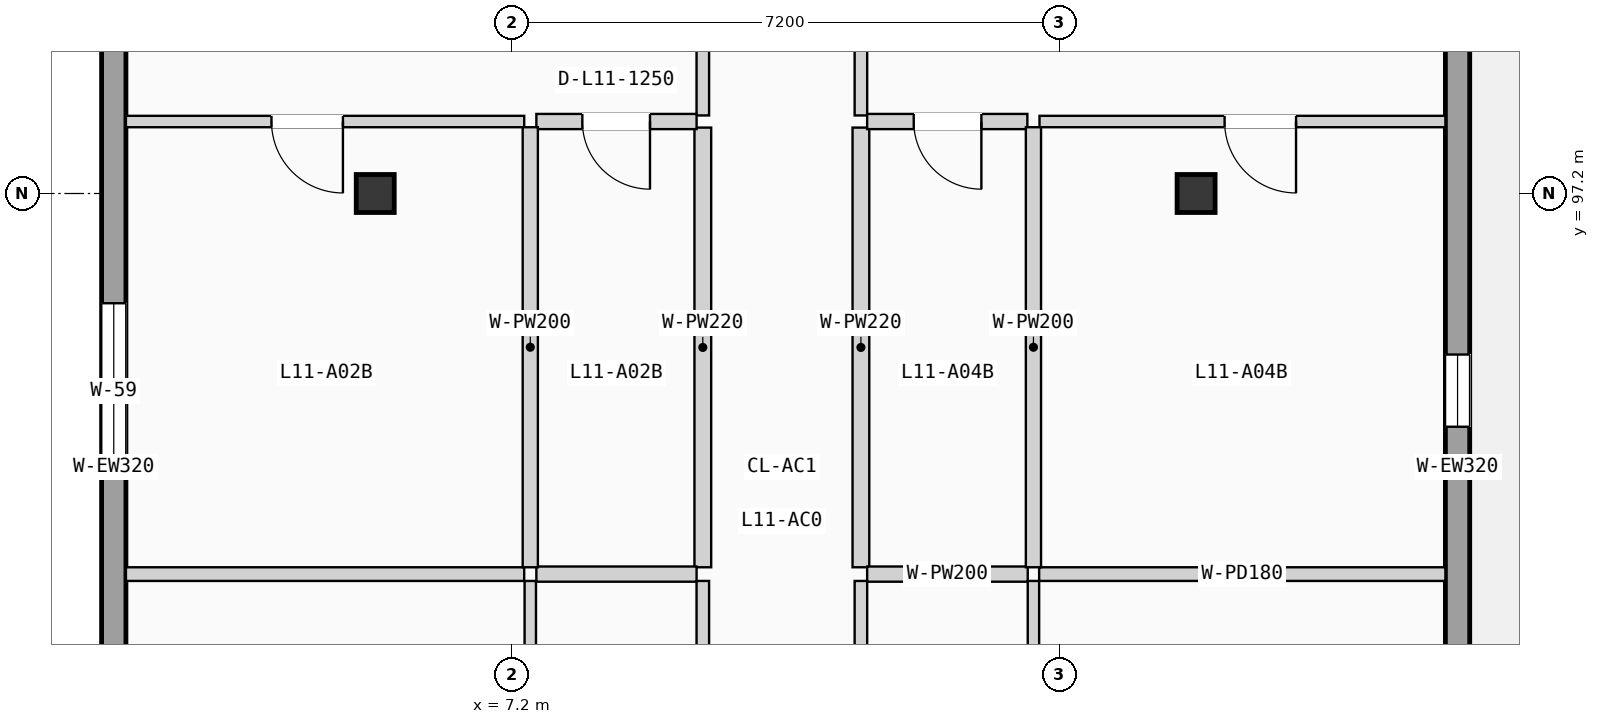
"""IFC4 building model, lengths in metres.
Left out: names, types, materials, properties, quantities, classifications, styles, units other than length and angle.
Written with IfcOpenShell. Run it as: python <this file> out.ifc"""

import sys

from ifc_helpers import new_model, si_unit, direction, frame, frame_2d, origin, origin_2d, place, context, subcontext, project, spatial, rectangle, extrude, element, fill, save


model = new_model("IFC4")
c1 = context("Model", 3, precision=1e-05, world=origin(), true_north=direction((0.0, 1.0)))
c2 = subcontext(c1, "Body", "Model", "MODEL_VIEW")
j1 = project(units=[si_unit("LENGTHUNIT", "METRE"), si_unit("PLANEANGLEUNIT", "RADIAN")], contexts=[c1])
p1 = place(None, origin())
s1 = spatial("IfcSite", under=j1, at=p1, CompositionType="ELEMENT")
p2 = place(p1, origin())
s2 = spatial("IfcBuilding", under=s1, at=p2, CompositionType="ELEMENT")
p3 = place(p2, frame((0.0, 0.0, 37.275)))
s3 = spatial("IfcBuildingStorey", under=s2, at=p3, CompositionType="ELEMENT", Elevation=37.275)
for number, where, z_axis, x_axis in (
    (1, (5.4, 97.2, 0.0), (0.0, 0.0, 1.0), (1.0, 0.0, 0.0)),
    (2, (16.2, 97.2, 0.0), (0.0, 0.0, 1.0), (1.0, 0.0, 0.0)),
):
    element("IfcColumn", number, at=place(p3, frame(where, z_axis=z_axis, x_axis=x_axis)), inside=s3, PredefinedType="COLUMN", context=c2, shape_type="SweptSolid", body=[
        extrude(rectangle(XDim=0.5, YDim=0.5, at=origin_2d()), origin(), (0.0, 0.0, 1.0), 3.15),
    ])
p4 = place(p3, frame((1.96, 68.72, 0.0), z_axis=(0.0, 0.0, 1.0), x_axis=(0.0, 1.0, 0.0)))
e3 = element("IfcWall", 3, at=p4, inside=s3, PredefinedType="SOLIDWALL", context=c2, shape_type="SweptSolid", body=[
    extrude(rectangle(XDim=49.76, YDim=0.32, at=frame_2d((24.88, 0.0))), origin(), (0.0, 0.0, 1.0), 2.9),
])
p5 = place(p4, frame((15.855, 0.0, 0.85)))
e4 = element("IfcOpeningElement", 4, at=p5, cuts=e3, PredefinedType="OPENING", context=c2, shape_type="SweptSolid", body=[
    extrude(rectangle(XDim=0.95, YDim=1.2, at=frame_2d((0.475, 0.6))), frame((0.0, 0.17, 0.0), z_axis=(0.0, -1.0, 0.0), x_axis=(1.0, 0.0, 0.0)), (0.0, 0.0, 1.0), 0.34),
])
p6 = place(p4, frame((8.586, 0.0, 0.9)))
e5 = element("IfcOpeningElement", 5, at=p6, cuts=e3, PredefinedType="OPENING", context=c2, shape_type="SweptSolid", body=[
    extrude(rectangle(XDim=2.3, YDim=1.2, at=frame_2d((1.15, 0.6))), frame((0.0, 0.17, 0.0), z_axis=(0.0, -1.0, 0.0), x_axis=(1.0, 0.0, 0.0)), (0.0, 0.0, 1.0), 0.34),
])
p7 = place(p4, frame((19.265, 0.0, 0.85)))
e6 = element("IfcOpeningElement", 6, at=p7, cuts=e3, PredefinedType="OPENING", context=c2, shape_type="SweptSolid", body=[
    extrude(rectangle(XDim=0.95, YDim=1.2, at=frame_2d((0.475, 0.6))), frame((0.0, 0.17, 0.0), z_axis=(0.0, -1.0, 0.0), x_axis=(1.0, 0.0, 0.0)), (0.0, 0.0, 1.0), 0.34),
])
p8 = place(p4, frame((31.309, 0.0, 0.715)))
e7 = element("IfcOpeningElement", 7, at=p8, cuts=e3, PredefinedType="OPENING", context=c2, shape_type="SweptSolid", body=[
    extrude(rectangle(XDim=2.3, YDim=1.5, at=frame_2d((1.15, 0.75))), frame((0.0, 0.17, 0.0), z_axis=(0.0, -1.0, 0.0), x_axis=(1.0, 0.0, 0.0)), (0.0, 0.0, 1.0), 0.34),
])
p9 = place(p4, frame((24.736, 0.0, 0.565)))
e8 = element("IfcOpeningElement", 8, at=p9, cuts=e3, PredefinedType="OPENING", context=c2, shape_type="SweptSolid", body=[
    extrude(rectangle(XDim=2.3, YDim=1.65, at=frame_2d((1.15, 0.825))), frame((0.0, 0.17, 0.0), z_axis=(0.0, -1.0, 0.0), x_axis=(1.0, 0.0, 0.0)), (0.0, 0.0, 1.0), 0.34),
])
p10 = place(p4, frame((39.113, 0.0, 0.85)))
e9 = element("IfcOpeningElement", 9, at=p10, cuts=e3, PredefinedType="OPENING", context=c2, shape_type="SweptSolid", body=[
    extrude(rectangle(XDim=0.95, YDim=1.2, at=frame_2d((0.475, 0.6))), frame((0.0, 0.17, 0.0), z_axis=(0.0, -1.0, 0.0), x_axis=(1.0, 0.0, 0.0)), (0.0, 0.0, 1.0), 0.34),
])
p11 = place(p3, frame((19.64, 68.72, 0.0), z_axis=(0.0, 0.0, 1.0), x_axis=(0.0, 1.0, 0.0)))
e10 = element("IfcWall", 10, at=p11, inside=s3, PredefinedType="SOLIDWALL", context=c2, shape_type="SweptSolid", body=[
    extrude(rectangle(XDim=49.76, YDim=0.32, at=frame_2d((24.88, 0.0))), origin(), (0.0, 0.0, 1.0), 2.9),
])
p12 = place(p11, frame((16.27, 0.0, 0.0)))
e11 = element("IfcOpeningElement", 11, at=p12, cuts=e10, PredefinedType="OPENING", context=c2, shape_type="SweptSolid", body=[
    extrude(rectangle(XDim=0.95, YDim=2.15, at=frame_2d((0.475, 1.075))), frame((0.0, 0.17, 0.0), z_axis=(0.0, -1.0, 0.0), x_axis=(1.0, 0.0, 0.0)), (0.0, 0.0, 1.0), 0.34),
])
p13 = place(p11, frame((9.261, 0.0, 0.9)))
e12 = element("IfcOpeningElement", 12, at=p13, cuts=e10, PredefinedType="OPENING", context=c2, shape_type="SweptSolid", body=[
    extrude(rectangle(XDim=0.95, YDim=1.2, at=frame_2d((0.475, 0.6))), frame((0.0, 0.17, 0.0), z_axis=(0.0, -1.0, 0.0), x_axis=(1.0, 0.0, 0.0)), (0.0, 0.0, 1.0), 0.34),
])
p14 = place(p11, frame((19.265, 0.0, 0.865)))
e13 = element("IfcOpeningElement", 13, at=p14, cuts=e10, PredefinedType="OPENING", context=c2, shape_type="SweptSolid", body=[
    extrude(rectangle(XDim=0.95, YDim=1.35, at=frame_2d((0.475, 0.675))), frame((0.0, 0.17, 0.0), z_axis=(0.0, -1.0, 0.0), x_axis=(1.0, 0.0, 0.0)), (0.0, 0.0, 1.0), 0.34),
])
p15 = place(p11, frame((31.984, 0.0, 0.715)))
e14 = element("IfcOpeningElement", 14, at=p15, cuts=e10, PredefinedType="OPENING", context=c2, shape_type="SweptSolid", body=[
    extrude(rectangle(XDim=0.95, YDim=1.5, at=frame_2d((0.475, 0.75))), frame((0.0, 0.17, 0.0), z_axis=(0.0, -1.0, 0.0), x_axis=(1.0, 0.0, 0.0)), (0.0, 0.0, 1.0), 0.34),
])
p16 = place(p11, frame((25.411, 0.0, 0.565)))
e15 = element("IfcOpeningElement", 15, at=p16, cuts=e10, PredefinedType="OPENING", context=c2, shape_type="SweptSolid", body=[
    extrude(rectangle(XDim=0.95, YDim=1.65, at=frame_2d((0.475, 0.825))), frame((0.0, 0.17, 0.0), z_axis=(0.0, -1.0, 0.0), x_axis=(1.0, 0.0, 0.0)), (0.0, 0.0, 1.0), 0.34),
])
p17 = place(p11, frame((39.113, 0.0, 0.85)))
e16 = element("IfcOpeningElement", 16, at=p17, cuts=e10, PredefinedType="OPENING", context=c2, shape_type="SweptSolid", body=[
    extrude(rectangle(XDim=0.95, YDim=1.2, at=frame_2d((0.475, 0.6))), frame((0.0, 0.17, 0.0), z_axis=(0.0, -1.0, 0.0), x_axis=(1.0, 0.0, 0.0)), (0.0, 0.0, 1.0), 0.34),
])
p18 = place(p3, frame((9.71, 87.19, 0.0), z_axis=(0.0, 0.0, 1.0), x_axis=(0.0, 1.0, 0.0)))
e17 = element("IfcWall", 17, at=p18, inside=s3, PredefinedType="PARTITIONING", context=c2, shape_type="SweptSolid", body=[
    extrude(rectangle(XDim=4.912, YDim=0.165, at=frame_2d((2.456, 0.0))), origin(), (0.0, 0.0, 1.0), 2.87),
])
p19 = place(p3, frame((9.71, 98.227, 0.0), z_axis=(0.0, 0.0, 1.0), x_axis=(0.0, 1.0, 0.0)))
e18 = element("IfcWall", 18, at=p19, inside=s3, PredefinedType="PARTITIONING", context=c2, shape_type="SweptSolid", body=[
    extrude(rectangle(XDim=7.028, YDim=0.165, at=frame_2d((3.514, 0.0))), origin(), (0.0, 0.0, 1.0), 2.87),
])
p20 = place(p19, frame((3.024, 0.0, 0.0)))
e19 = element("IfcOpeningElement", 19, at=p20, cuts=e18, PredefinedType="OPENING", context=c2, shape_type="SweptSolid", body=[
    extrude(rectangle(XDim=0.98, YDim=2.08, at=frame_2d((0.49, 1.04))), frame((0.0, 0.093, 0.0), z_axis=(0.0, -1.0, 0.0), x_axis=(1.0, 0.0, 0.0)), (0.0, 0.0, 1.0), 0.185),
])
p21 = place(p3, frame((9.71, 92.282, 0.0), z_axis=(0.0, 0.0, 1.0), x_axis=(0.0, 1.0, 0.0)))
e20 = element("IfcWall", 20, at=p21, inside=s3, PredefinedType="PLUMBINGWALL", context=c2, shape_type="SweptSolid", body=[
    extrude(rectangle(XDim=5.785, YDim=0.22, at=frame_2d((2.893, 0.0))), origin(), (0.0, 0.0, 1.0), 2.87),
])
p22 = place(p3, frame((11.79, 87.19, 0.0), z_axis=(0.0, 0.0, 1.0), x_axis=(0.0, 1.0, 0.0)))
e21 = element("IfcWall", 21, at=p22, inside=s3, PredefinedType="PARTITIONING", context=c2, shape_type="SweptSolid", body=[
    extrude(rectangle(XDim=4.912, YDim=0.165, at=frame_2d((2.456, 0.0))), origin(), (0.0, 0.0, 1.0), 2.87),
])
p23 = place(p3, frame((11.79, 98.227, 0.0), z_axis=(0.0, 0.0, 1.0), x_axis=(0.0, 1.0, 0.0)))
e22 = element("IfcWall", 22, at=p23, inside=s3, PredefinedType="PARTITIONING", context=c2, shape_type="SweptSolid", body=[
    extrude(rectangle(XDim=7.028, YDim=0.165, at=frame_2d((3.514, 0.0))), origin(), (0.0, 0.0, 1.0), 2.87),
])
p24 = place(p23, frame((3.024, 0.0, 0.0)))
e23 = element("IfcOpeningElement", 23, at=p24, cuts=e22, PredefinedType="OPENING", context=c2, shape_type="SweptSolid", body=[
    extrude(rectangle(XDim=0.98, YDim=2.08, at=frame_2d((0.49, 1.04))), frame((0.0, 0.093, 0.0), z_axis=(0.0, -1.0, 0.0), x_axis=(1.0, 0.0, 0.0)), (0.0, 0.0, 1.0), 0.185),
])
p25 = place(p3, frame((11.79, 92.282, 0.0), z_axis=(0.0, 0.0, 1.0), x_axis=(0.0, 1.0, 0.0)))
e24 = element("IfcWall", 24, at=p25, inside=s3, PredefinedType="PLUMBINGWALL", context=c2, shape_type="SweptSolid", body=[
    extrude(rectangle(XDim=5.785, YDim=0.22, at=frame_2d((2.893, 0.0))), origin(), (0.0, 0.0, 1.0), 2.87),
])
p26 = place(p3, frame((7.44, 87.17, 0.0), z_axis=(0.0, 0.0, 1.0), x_axis=(0.0, 1.0, 0.0)))
e25 = element("IfcWall", 25, at=p26, inside=s3, PredefinedType="PARTITIONING", context=c2, shape_type="SweptSolid", body=[
    extrude(rectangle(XDim=4.932, YDim=0.15, at=frame_2d((2.466, 0.0))), origin(), (0.0, 0.0, 1.0), 2.87),
])
p27 = place(p3, frame((7.52, 92.192, 0.0), z_axis=(0.0, 0.0, 1.0), x_axis=(1.0, 0.0, 0.0)))
e26 = element("IfcWall", 26, at=p27, inside=s3, PredefinedType="PLUMBINGWALL", context=c2, shape_type="SweptSolid", body=[
    extrude(rectangle(XDim=2.108, YDim=0.2, at=frame_2d((1.054, 0.0))), origin(), (0.0, 0.0, 1.0), 2.87),
])
p28 = place(p3, frame((2.12, 92.192, 0.0), z_axis=(0.0, 0.0, 1.0), x_axis=(1.0, 0.0, 0.0)))
e27 = element("IfcWall", 27, at=p28, inside=s3, PredefinedType="PARTITIONING", context=c2, shape_type="SweptSolid", body=[
    extrude(rectangle(XDim=5.24, YDim=0.18, at=frame_2d((2.62, 0.0))), origin(), (0.0, 0.0, 1.0), 2.87),
])
p29 = place(p3, frame((7.52, 98.147, 0.0), z_axis=(0.0, 0.0, 1.0), x_axis=(1.0, 0.0, 0.0)))
e28 = element("IfcWall", 28, at=p29, inside=s3, PredefinedType="PLUMBINGWALL", context=c2, shape_type="SweptSolid", body=[
    extrude(rectangle(XDim=2.108, YDim=0.2, at=frame_2d((1.054, 0.0))), origin(), (0.0, 0.0, 1.0), 2.87),
])
p30 = place(p29, frame((0.605, 0.0, 0.0)))
e29 = element("IfcOpeningElement", 29, at=p30, cuts=e28, PredefinedType="OPENING", context=c2, shape_type="SweptSolid", body=[
    extrude(rectangle(XDim=0.89, YDim=2.03, at=frame_2d((0.445, 1.015))), frame((0.0, 0.11, 0.0), z_axis=(0.0, -1.0, 0.0), x_axis=(1.0, 0.0, 0.0)), (0.0, 0.0, 1.0), 0.22),
])
p31 = place(p3, frame((2.12, 98.147, 0.0), z_axis=(0.0, 0.0, 1.0), x_axis=(1.0, 0.0, 0.0)))
e30 = element("IfcWall", 30, at=p31, inside=s3, PredefinedType="PARTITIONING", context=c2, shape_type="SweptSolid", body=[
    extrude(rectangle(XDim=5.24, YDim=0.15, at=frame_2d((2.62, 0.0))), origin(), (0.0, 0.0, 1.0), 2.87),
])
p32 = place(p31, frame((1.915, 0.0, 0.0)))
e31 = element("IfcOpeningElement", 31, at=p32, cuts=e30, PredefinedType="OPENING", context=c2, shape_type="SweptSolid", body=[
    extrude(rectangle(XDim=0.94, YDim=2.06, at=frame_2d((0.47, 1.03))), frame((0.0, 0.085, 0.0), z_axis=(0.0, -1.0, 0.0), x_axis=(1.0, 0.0, 0.0)), (0.0, 0.0, 1.0), 0.17),
])
p33 = place(p3, frame((7.44, 92.282, 0.0), z_axis=(0.0, 0.0, 1.0), x_axis=(0.0, 1.0, 0.0)))
e32 = element("IfcWall", 32, at=p33, inside=s3, PredefinedType="PLUMBINGWALL", context=c2, shape_type="SweptSolid", body=[
    extrude(rectangle(XDim=5.79, YDim=0.2, at=frame_2d((2.895, 0.0))), origin(), (0.0, 0.0, 1.0), 2.87),
])
p34 = place(p3, frame((14.06, 87.17, 0.0), z_axis=(0.0, 0.0, 1.0), x_axis=(0.0, 1.0, 0.0)))
e33 = element("IfcWall", 33, at=p34, inside=s3, PredefinedType="PARTITIONING", context=c2, shape_type="SweptSolid", body=[
    extrude(rectangle(XDim=4.932, YDim=0.15, at=frame_2d((2.466, 0.0))), origin(), (0.0, 0.0, 1.0), 2.87),
])
p35 = place(p3, frame((11.872, 92.192, 0.0), z_axis=(0.0, 0.0, 1.0), x_axis=(1.0, 0.0, 0.0)))
e34 = element("IfcWall", 34, at=p35, inside=s3, PredefinedType="PLUMBINGWALL", context=c2, shape_type="SweptSolid", body=[
    extrude(rectangle(XDim=2.113, YDim=0.2, at=frame_2d((1.057, 0.0))), origin(), (0.0, 0.0, 1.0), 2.87),
])
p36 = place(p3, frame((14.135, 92.192, 0.0), z_axis=(0.0, 0.0, 1.0), x_axis=(1.0, 0.0, 0.0)))
e35 = element("IfcWall", 35, at=p36, inside=s3, PredefinedType="PARTITIONING", context=c2, shape_type="SweptSolid", body=[
    extrude(rectangle(XDim=5.345, YDim=0.18, at=frame_2d((2.672, 0.0))), origin(), (0.0, 0.0, 1.0), 2.87),
])
p37 = place(p3, frame((11.872, 98.147, 0.0), z_axis=(0.0, 0.0, 1.0), x_axis=(1.0, 0.0, 0.0)))
e36 = element("IfcWall", 36, at=p37, inside=s3, PredefinedType="PLUMBINGWALL", context=c2, shape_type="SweptSolid", body=[
    extrude(rectangle(XDim=2.108, YDim=0.2, at=frame_2d((1.054, 0.0))), origin(), (0.0, 0.0, 1.0), 2.87),
])
p38 = place(p37, frame((0.613, 0.0, 0.0)))
e37 = element("IfcOpeningElement", 37, at=p38, cuts=e36, PredefinedType="OPENING", context=c2, shape_type="SweptSolid", body=[
    extrude(rectangle(XDim=0.89, YDim=2.03, at=frame_2d((0.445, 1.015))), frame((0.0, 0.11, 0.0), z_axis=(0.0, -1.0, 0.0), x_axis=(1.0, 0.0, 0.0)), (0.0, 0.0, 1.0), 0.22),
])
p39 = place(p3, frame((14.14, 98.147, 0.0), z_axis=(0.0, 0.0, 1.0), x_axis=(1.0, 0.0, 0.0)))
e38 = element("IfcWall", 38, at=p39, inside=s3, PredefinedType="PARTITIONING", context=c2, shape_type="SweptSolid", body=[
    extrude(rectangle(XDim=5.34, YDim=0.15, at=frame_2d((2.67, 0.0))), origin(), (0.0, 0.0, 1.0), 2.87),
])
p40 = place(p39, frame((2.435, 0.0, 0.0)))
e39 = element("IfcOpeningElement", 39, at=p40, cuts=e38, PredefinedType="OPENING", context=c2, shape_type="SweptSolid", body=[
    extrude(rectangle(XDim=0.94, YDim=2.06, at=frame_2d((0.47, 1.03))), frame((0.0, 0.085, 0.0), z_axis=(0.0, -1.0, 0.0), x_axis=(1.0, 0.0, 0.0)), (0.0, 0.0, 1.0), 0.17),
])
p41 = place(p3, frame((14.06, 92.282, 0.0), z_axis=(0.0, 0.0, 1.0), x_axis=(0.0, 1.0, 0.0)))
e40 = element("IfcWall", 40, at=p41, inside=s3, PredefinedType="PLUMBINGWALL", context=c2, shape_type="SweptSolid", body=[
    extrude(rectangle(XDim=5.79, YDim=0.2, at=frame_2d((2.895, 0.0))), origin(), (0.0, 0.0, 1.0), 2.87),
])
p42 = place(p9, origin())
e41 = element("IfcWindow", 41, at=p42, inside=s3, PartitioningType="DOUBLE_PANEL_VERTICAL", PredefinedType="WINDOW", context=c2, shape_type="SweptSolid", body=[
    extrude(rectangle(XDim=2.3, YDim=1.65, at=frame_2d((1.15, 0.825))), frame((0.0, 0.03, 0.0), z_axis=(0.0, -1.0, 0.0), x_axis=(1.0, 0.0, 0.0)), (0.0, 0.0, 1.0), 0.06),
])
fill(e8, e41)
p43 = place(p16, origin())
e42 = element("IfcWindow", 42, at=p43, inside=s3, PartitioningType="SINGLE_PANEL", PredefinedType="WINDOW", context=c2, shape_type="SweptSolid", body=[
    extrude(rectangle(XDim=0.95, YDim=1.65, at=frame_2d((0.475, 0.825))), frame((0.0, 0.03, 0.0), z_axis=(0.0, -1.0, 0.0), x_axis=(1.0, 0.0, 0.0)), (0.0, 0.0, 1.0), 0.06),
])
fill(e15, e42)
p44 = place(p30, frame((0.89, 0.0, 0.0), z_axis=(0.0, 0.0, 1.0), x_axis=(-1.0, 0.0, 0.0)))
e43 = element("IfcDoor", 43, at=p44, inside=s3, OperationType="SINGLE_SWING_RIGHT", PredefinedType="DOOR", context=c2, shape_type="SweptSolid", body=[
    extrude(rectangle(XDim=0.89, YDim=2.03, at=frame_2d((0.445, 1.015))), frame((0.0, 0.025, 0.0), z_axis=(0.0, -1.0, 0.0), x_axis=(1.0, 0.0, 0.0)), (0.0, 0.0, 1.0), 0.05),
])
fill(e29, e43)
p45 = place(p32, frame((0.94, 0.0, 0.0), z_axis=(0.0, 0.0, 1.0), x_axis=(-1.0, 0.0, 0.0)))
e44 = element("IfcDoor", 44, at=p45, inside=s3, OperationType="SINGLE_SWING_RIGHT", PredefinedType="DOOR", context=c2, shape_type="SweptSolid", body=[
    extrude(rectangle(XDim=0.94, YDim=2.06, at=frame_2d((0.47, 1.03))), frame((0.0, 0.025, 0.0), z_axis=(0.0, -1.0, 0.0), x_axis=(1.0, 0.0, 0.0)), (0.0, 0.0, 1.0), 0.05),
])
fill(e31, e44)
p46 = place(p38, frame((0.89, 0.0, 0.0), z_axis=(0.0, 0.0, 1.0), x_axis=(-1.0, 0.0, 0.0)))
e45 = element("IfcDoor", 45, at=p46, inside=s3, OperationType="SINGLE_SWING_RIGHT", PredefinedType="DOOR", context=c2, shape_type="SweptSolid", body=[
    extrude(rectangle(XDim=0.89, YDim=2.03, at=frame_2d((0.445, 1.015))), frame((0.0, 0.025, 0.0), z_axis=(0.0, -1.0, 0.0), x_axis=(1.0, 0.0, 0.0)), (0.0, 0.0, 1.0), 0.05),
])
fill(e37, e45)
p47 = place(p40, frame((0.94, 0.0, 0.0), z_axis=(0.0, 0.0, 1.0), x_axis=(-1.0, 0.0, 0.0)))
e46 = element("IfcDoor", 46, at=p47, inside=s3, OperationType="SINGLE_SWING_RIGHT", PredefinedType="DOOR", context=c2, shape_type="SweptSolid", body=[
    extrude(rectangle(XDim=0.94, YDim=2.06, at=frame_2d((0.47, 1.03))), frame((0.0, 0.025, 0.0), z_axis=(0.0, -1.0, 0.0), x_axis=(1.0, 0.0, 0.0)), (0.0, 0.0, 1.0), 0.05),
])
fill(e39, e46)
save(model, sys.argv[1])
